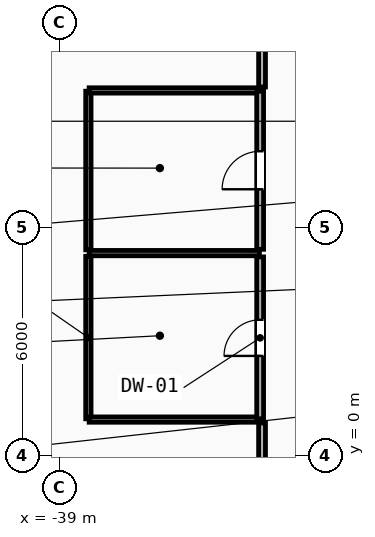
"""IFC4 building model, lengths in metres.
Left out: names, types, materials, properties, quantities, classifications, styles, units other than length and angle.
Written with IfcOpenShell. Run it as: python <this file> out.ifc"""

import sys

from ifc_helpers import new_model, si_unit, direction, frame, frame_2d, origin, place, context, subcontext, project, spatial, rectangle, extrude, element, fill, save


model = new_model("IFC4")
c1 = context("Model", 3, precision=1e-05, world=origin(), true_north=direction((0.0, 1.0)))
c2 = subcontext(c1, "Body", "Model", "MODEL_VIEW")
j1 = project(units=[si_unit("LENGTHUNIT", "METRE"), si_unit("PLANEANGLEUNIT", "RADIAN")], contexts=[c1])
p1 = place(None, origin())
s1 = spatial("IfcSite", under=j1, at=p1, CompositionType="ELEMENT")
p2 = place(p1, origin())
s2 = spatial("IfcBuilding", under=s1, at=p2, CompositionType="ELEMENT")
p3 = place(p2, frame((0.0, 0.0, 125.0)))
s3 = spatial("IfcBuildingStorey", under=s2, at=p3, CompositionType="ELEMENT", Elevation=125.0)
p4 = place(p3, frame((-38.24, 0.97, 0.0), z_axis=(0.0, 0.0, 1.0), x_axis=(0.0, 1.0, 0.0)))
e1 = element("IfcWall", 1, at=p4, inside=s3, PredefinedType="PARTITIONING", context=c2, shape_type="SweptSolid", body=[
    extrude(rectangle(XDim=4.275, YDim=0.14, at=frame_2d((2.138, 0.0))), origin(), (0.0, 0.0, 1.0), 3.3),
])
p5 = place(p3, frame((-38.24, 5.415, 0.0), z_axis=(0.0, 0.0, 1.0), x_axis=(0.0, 1.0, 0.0)))
e2 = element("IfcWall", 2, at=p5, inside=s3, PredefinedType="PARTITIONING", context=c2, shape_type="SweptSolid", body=[
    extrude(rectangle(XDim=4.175, YDim=0.14, at=frame_2d((2.087, 0.0))), origin(), (0.0, 0.0, 1.0), 3.3),
])
for number, where, z_axis, x_axis in (
    (3, (-38.22, 0.95, 0.0), (0.0, 0.0, 1.0), (1.0, 0.0, 0.0)),
    (4, (-38.22, 5.33, 0.0), (0.0, 0.0, 1.0), (1.0, 0.0, 0.0)),
    (5, (-38.22, 9.61, 0.0), (0.0, 0.0, 1.0), (1.0, 0.0, 0.0)),
):
    element("IfcWall", number, at=place(p3, frame(where, z_axis=z_axis, x_axis=x_axis)), inside=s3, PredefinedType="PARTITIONING", context=c2, shape_type="SweptSolid", body=[
        extrude(rectangle(XDim=4.48, YDim=0.14, at=frame_2d((2.24, 0.0))), origin(), (0.0, 0.0, 1.0), 3.3),
    ])
p6 = place(p3, frame((-33.72, 0.97, 0.0), z_axis=(0.0, 0.0, 1.0), x_axis=(0.0, 1.0, 0.0)))
e6 = element("IfcWall", 6, at=p6, inside=s3, PredefinedType="PARTITIONING", context=c2, shape_type="SweptSolid", body=[
    extrude(rectangle(XDim=4.26, YDim=0.18, at=frame_2d((2.13, 0.0))), origin(), (0.0, 0.0, 1.0), 3.3),
])
p7 = place(p6, frame((1.655, 0.0, 0.0)))
e7 = element("IfcOpeningElement", 7, at=p7, cuts=e6, PredefinedType="OPENING", context=c2, shape_type="SweptSolid", body=[
    extrude(rectangle(XDim=0.95, YDim=2.1, at=frame_2d((0.475, 1.05))), frame((0.0, 0.1, 0.0), z_axis=(0.0, -1.0, 0.0), x_axis=(1.0, 0.0, 0.0)), (0.0, 0.0, 1.0), 0.2),
])
p8 = place(p3, frame((-33.72, 5.43, 0.0), z_axis=(0.0, 0.0, 1.0), x_axis=(0.0, 1.0, 0.0)))
e8 = element("IfcWall", 8, at=p8, inside=s3, PredefinedType="PARTITIONING", context=c2, shape_type="SweptSolid", body=[
    extrude(rectangle(XDim=4.16, YDim=0.18, at=frame_2d((2.08, 0.0))), origin(), (0.0, 0.0, 1.0), 3.3),
])
p9 = place(p8, frame((1.58, 0.0, 0.0)))
e9 = element("IfcOpeningElement", 9, at=p9, cuts=e8, PredefinedType="OPENING", context=c2, shape_type="SweptSolid", body=[
    extrude(rectangle(XDim=1.0, YDim=2.15, at=frame_2d((0.5, 1.075))), frame((0.0, 0.1, 0.0), z_axis=(0.0, -1.0, 0.0), x_axis=(1.0, 0.0, 0.0)), (0.0, 0.0, 1.0), 0.2),
])
p10 = place(p3, frame((-33.67, 0.859, 0.0), z_axis=(0.0, 0.0, 1.0), x_axis=(0.0, -1.0, 0.0)))
e10 = element("IfcWall", 10, at=p10, inside=s3, PredefinedType="PARTITIONING", context=c2, shape_type="SweptSolid", body=[
    extrude(rectangle(XDim=12.259, YDim=0.18, at=frame_2d((6.129, 0.0))), origin(), (0.0, 0.0, 1.0), 3.3),
])
p11 = place(p3, frame((-33.67, 17.428, 0.0), z_axis=(0.0, 0.0, 1.0), x_axis=(0.0, -1.0, 0.0)))
e11 = element("IfcWall", 11, at=p11, inside=s3, PredefinedType="PARTITIONING", context=c2, shape_type="SweptSolid", body=[
    extrude(rectangle(XDim=7.727, YDim=0.18, at=frame_2d((3.864, 0.0))), origin(), (0.0, 0.0, 1.0), 3.3),
])
p12 = place(p7, origin())
e12 = element("IfcDoor", 12, at=p12, inside=s3, OperationType="SINGLE_SWING_LEFT", PredefinedType="DOOR", context=c2, shape_type="SweptSolid", body=[
    extrude(rectangle(XDim=0.95, YDim=2.1, at=frame_2d((0.475, 1.05))), frame((0.0, 0.025, 0.0), z_axis=(0.0, -1.0, 0.0), x_axis=(1.0, 0.0, 0.0)), (0.0, 0.0, 1.0), 0.05),
])
fill(e7, e12)
p13 = place(p9, origin())
e13 = element("IfcDoor", 13, at=p13, inside=s3, OperationType="SINGLE_SWING_LEFT", PredefinedType="DOOR", context=c2, shape_type="SweptSolid", body=[
    extrude(rectangle(XDim=1.0, YDim=2.15, at=frame_2d((0.5, 1.075))), frame((0.0, 0.025, 0.0), z_axis=(0.0, -1.0, 0.0), x_axis=(1.0, 0.0, 0.0)), (0.0, 0.0, 1.0), 0.05),
])
fill(e9, e13)
save(model, sys.argv[1])
